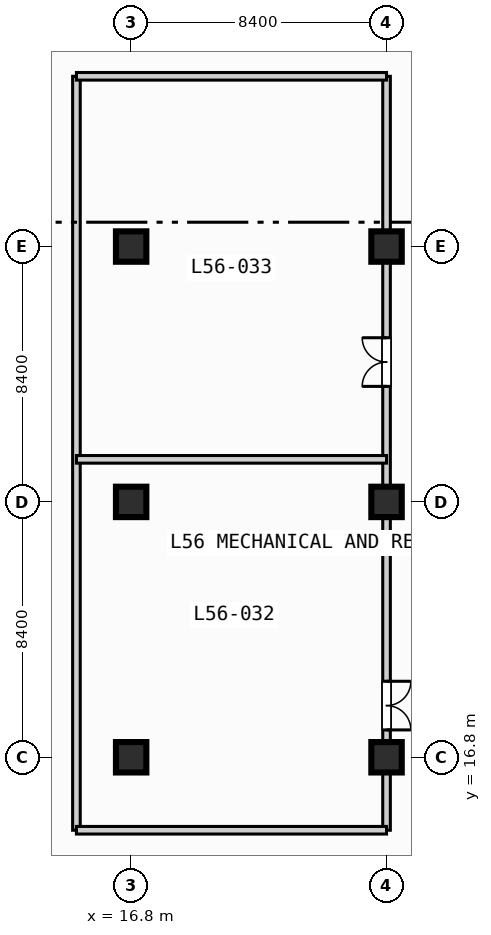
"""IFC4 building model, lengths in metres.
Left out: names, types, materials, properties, quantities, classifications, styles, units other than length and angle.
Written with IfcOpenShell. Run it as: python <this file> out.ifc"""

import sys

from ifc_helpers import new_model, si_unit, direction, frame, frame_2d, origin, origin_2d, place, context, subcontext, project, spatial, rectangle, extrude, element, fill, save


model = new_model("IFC4")
c1 = context("Model", 3, precision=1e-05, world=origin(), true_north=direction((0.0, 1.0)))
c2 = subcontext(c1, "Body", "Model", "MODEL_VIEW")
j1 = project(units=[si_unit("LENGTHUNIT", "METRE"), si_unit("PLANEANGLEUNIT", "RADIAN")], contexts=[c1])
p1 = place(None, origin())
s1 = spatial("IfcSite", under=j1, at=p1, CompositionType="ELEMENT")
p2 = place(p1, origin())
s2 = spatial("IfcBuilding", under=s1, at=p2, CompositionType="ELEMENT")
p3 = place(p2, frame((0.0, 0.0, 228.2)))
s3 = spatial("IfcBuildingStorey", under=s2, at=p3, CompositionType="ELEMENT", Elevation=228.2)
for number, where, z_axis, x_axis in (
    (1, (16.8, 16.8, 0.0), (0.0, 0.0, 1.0), (1.0, 0.0, 0.0)),
    (2, (16.8, 25.2, 0.0), (0.0, 0.0, 1.0), (1.0, 0.0, 0.0)),
    (3, (16.8, 33.6, 0.0), (0.0, 0.0, 1.0), (1.0, 0.0, 0.0)),
    (4, (25.2, 16.8, 0.0), (0.0, 0.0, 1.0), (1.0, 0.0, 0.0)),
    (5, (25.2, 25.2, 0.0), (0.0, 0.0, 1.0), (1.0, 0.0, 0.0)),
    (6, (25.2, 33.6, 0.0), (0.0, 0.0, 1.0), (1.0, 0.0, 0.0)),
):
    element("IfcColumn", number, at=place(p3, frame(where, z_axis=z_axis, x_axis=x_axis)), inside=s3, PredefinedType="COLUMN", context=c2, shape_type="SweptSolid", body=[
        extrude(rectangle(XDim=1.0, YDim=1.0, at=origin_2d()), origin(), (0.0, 0.0, 1.0), 6.0),
    ])
p4 = place(p3, frame((25.2, 14.4, 0.0), z_axis=(0.0, 0.0, 1.0), x_axis=(0.0, 1.0, 0.0)))
e7 = element("IfcWall", 7, at=p4, inside=s3, PredefinedType="SOLIDWALL", context=c2, shape_type="SweptSolid", body=[
    extrude(rectangle(XDim=24.8, YDim=0.25, at=frame_2d((12.4, 0.0))), origin(), (0.0, 0.0, 1.0), 5.12),
])
p5 = place(p4, frame((3.3, 0.0, 0.0)))
e8 = element("IfcOpeningElement", 8, at=p5, cuts=e7, PredefinedType="OPENING", context=c2, shape_type="SweptSolid", body=[
    extrude(rectangle(XDim=1.6, YDim=2.2, at=frame_2d((0.8, 1.1))), frame((0.0, 0.135, 0.0), z_axis=(0.0, -1.0, 0.0), x_axis=(1.0, 0.0, 0.0)), (0.0, 0.0, 1.0), 0.27),
])
p6 = place(p4, frame((14.6, 0.0, 0.0)))
e9 = element("IfcOpeningElement", 9, at=p6, cuts=e7, PredefinedType="OPENING", context=c2, shape_type="SweptSolid", body=[
    extrude(rectangle(XDim=1.6, YDim=2.2, at=frame_2d((0.8, 1.1))), frame((0.0, 0.135, 0.0), z_axis=(0.0, -1.0, 0.0), x_axis=(1.0, 0.0, 0.0)), (0.0, 0.0, 1.0), 0.27),
])
p7 = place(p3, frame((15.0, 14.4, 0.0), z_axis=(0.0, 0.0, 1.0), x_axis=(0.0, 1.0, 0.0)))
e10 = element("IfcWall", 10, at=p7, inside=s3, PredefinedType="SOLIDWALL", context=c2, shape_type="SweptSolid", body=[
    extrude(rectangle(XDim=24.8, YDim=0.25, at=frame_2d((12.4, 0.0))), origin(), (0.0, 0.0, 1.0), 5.77),
])
for number, where, z_axis, x_axis in (
    (11, (15.0, 14.4, 0.0), (0.0, 0.0, 1.0), (1.0, 0.0, 0.0)),
    (12, (15.0, 39.2, 0.0), (0.0, 0.0, 1.0), (1.0, 0.0, 0.0)),
    (13, (15.0, 26.6, 0.0), (0.0, 0.0, 1.0), (1.0, 0.0, 0.0)),
):
    element("IfcWall", number, at=place(p3, frame(where, z_axis=z_axis, x_axis=x_axis)), inside=s3, PredefinedType="SOLIDWALL", context=c2, shape_type="SweptSolid", body=[
        extrude(rectangle(XDim=10.2, YDim=0.25, at=frame_2d((5.1, 0.0))), origin(), (0.0, 0.0, 1.0), 5.77),
    ])
p8 = place(p5, origin())
e14 = element("IfcDoor", 14, at=p8, inside=s3, OperationType="SINGLE_SWING_RIGHT", PredefinedType="DOOR", context=c2, shape_type="SweptSolid", body=[
    extrude(rectangle(XDim=1.6, YDim=2.2, at=frame_2d((0.8, 1.1))), frame((0.0, 0.025, 0.0), z_axis=(0.0, -1.0, 0.0), x_axis=(1.0, 0.0, 0.0)), (0.0, 0.0, 1.0), 0.05),
])
fill(e8, e14)
p9 = place(p6, origin())
e15 = element("IfcDoor", 15, at=p9, inside=s3, OperationType="SINGLE_SWING_LEFT", PredefinedType="DOOR", context=c2, shape_type="SweptSolid", body=[
    extrude(rectangle(XDim=1.6, YDim=2.2, at=frame_2d((0.8, 1.1))), frame((0.0, 0.025, 0.0), z_axis=(0.0, -1.0, 0.0), x_axis=(1.0, 0.0, 0.0)), (0.0, 0.0, 1.0), 0.05),
])
fill(e9, e15)
save(model, sys.argv[1])
